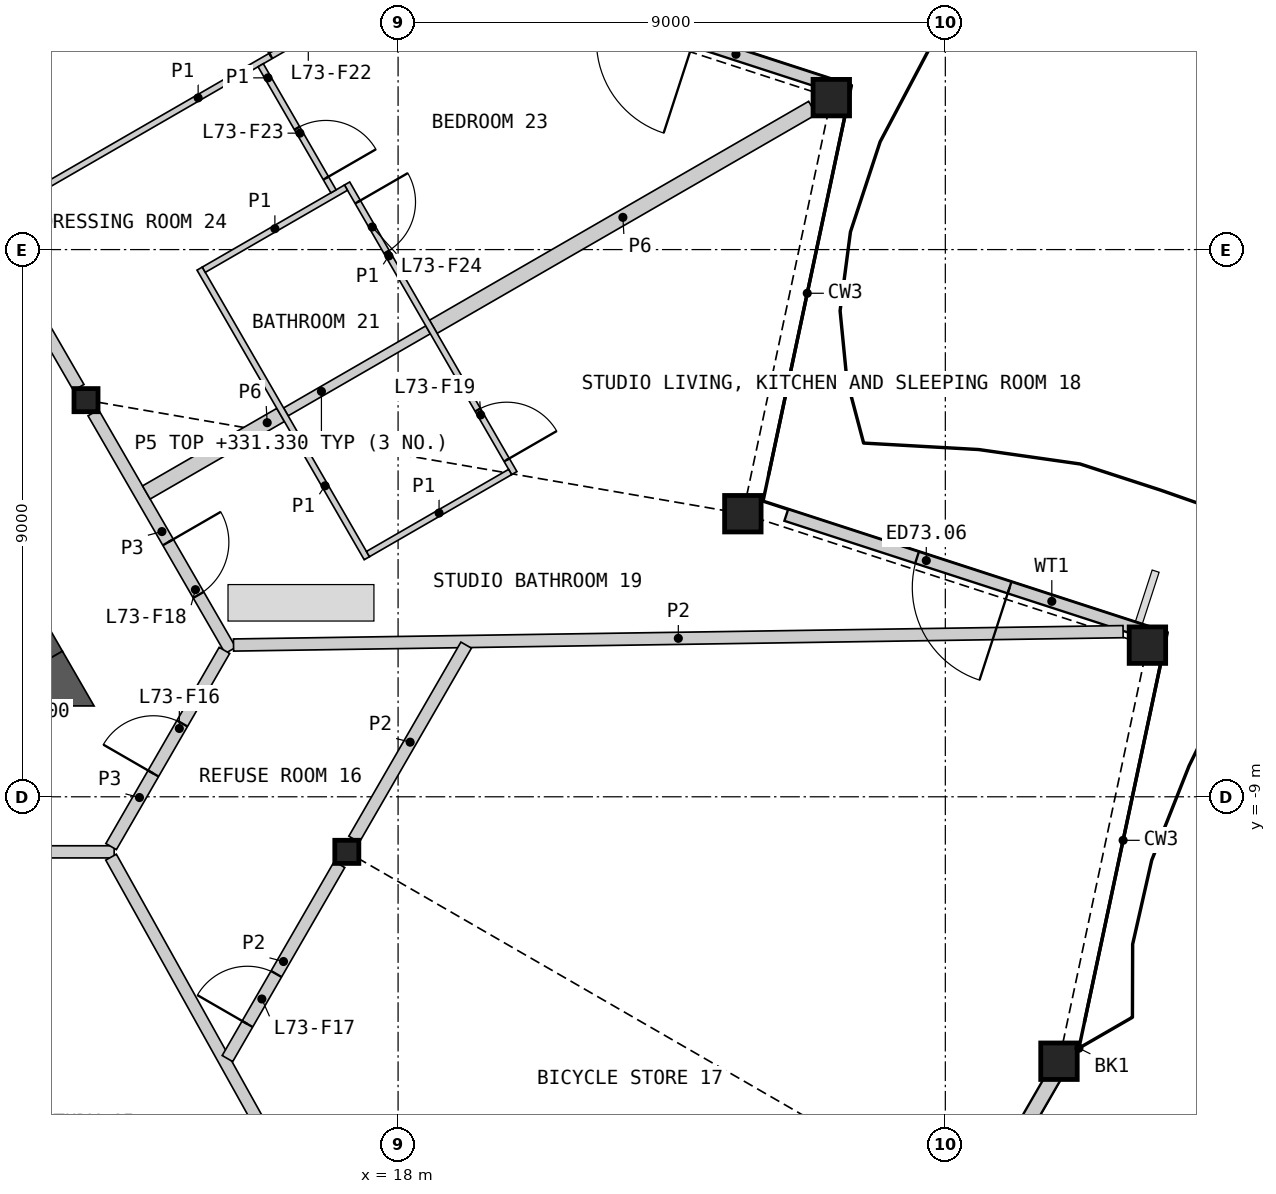
"""IFC4 building model, lengths in metres.
Left out: names, types, materials, properties, quantities, classifications, styles, units other than length and angle.
Written with IfcOpenShell. Run it as: python <this file> out.ifc"""

import sys

from ifc_helpers import new_model, si_unit, direction, frame, frame_2d, origin, origin_2d, place, context, subcontext, project, spatial, polyline, rectangle, hollow_rectangle, i_section, outline, extrude, element, fill, save


model = new_model("IFC4")
c1 = context("Model", 3, precision=1e-05, world=origin(), true_north=direction((0.0, 1.0)))
c2 = subcontext(c1, "Body", "Model", "MODEL_VIEW")
j1 = project(units=[si_unit("LENGTHUNIT", "METRE"), si_unit("PLANEANGLEUNIT", "RADIAN")], contexts=[c1])
p1 = place(None, origin())
s1 = spatial("IfcSite", under=j1, at=p1, CompositionType="ELEMENT")
p2 = place(p1, origin())
s2 = spatial("IfcBuilding", under=s1, at=p2, CompositionType="ELEMENT")
p3 = place(p2, frame((0.0, 0.0, 329.0)))
s3 = spatial("IfcBuildingStorey", under=s2, at=p3, CompositionType="ELEMENT", Elevation=329.0)
for number, where, z_axis, x_axis in (
    (1, (28.869, -13.349, 0.0), (0.0, 0.0, 1.0), (1.0, 0.0, 0.0)),
    (2, (30.324, -6.506, 0.0), (0.0, 0.0, 1.0), (1.0, 0.0, 0.0)),
    (3, (23.67, -4.344, 0.0), (0.0, 0.0, 1.0), (1.0, 0.0, 0.0)),
    (4, (25.125, 2.499, 0.0), (0.0, 0.0, 1.0), (1.0, 0.0, 0.0)),
):
    element("IfcColumn", number, at=place(p3, frame(where, z_axis=z_axis, x_axis=x_axis)), inside=s3, PredefinedType="COLUMN", context=c2, shape_type="SweptSolid", body=[
        extrude(hollow_rectangle(XDim=0.6, YDim=0.6, WallThickness=0.04, at=origin_2d()), origin(), (0.0, 0.0, 1.0), 3.4),
    ])
for number, where, z_axis, x_axis in (
    (5, (17.157, -9.906, 0.0), (0.0, 0.0, 1.0), (1.0, 0.0, 0.0)),
    (6, (12.868, -2.476, 0.0), (0.0, 0.0, 1.0), (1.0, 0.0, 0.0)),
):
    element("IfcColumn", number, at=place(p3, frame(where, z_axis=z_axis, x_axis=x_axis)), inside=s3, PredefinedType="COLUMN", context=c2, shape_type="SweptSolid", body=[
        extrude(i_section(OverallWidth=0.396, OverallDepth=0.381, WebThickness=0.019, FlangeThickness=0.03, at=origin_2d()), origin(), (0.0, 0.0, 1.0), 3.4),
    ])
p4 = place(p3, frame((27.68, -15.513, 0.0), z_axis=(0.0, 0.0, 1.0), x_axis=(0.499982446489, 0.866035538072, 0.0)))
e7 = element("IfcWall", 7, at=p4, inside=s3, PredefinedType="SOLIDWALL", context=c2, shape_type="SweptSolid", body=[
    extrude(rectangle(XDim=2.384, YDim=0.25, at=frame_2d((1.192, 0.0))), origin(), (0.0, 0.0, 1.0), 2.488),
])
p5 = place(p3, frame((30.207, -6.258, 0.0), z_axis=(0.0, 0.0, 1.0), x_axis=(-0.951056631566, 0.309016639608, 0.0)))
e8 = element("IfcWall", 8, at=p5, inside=s3, PredefinedType="SOLIDWALL", context=c2, shape_type="SweptSolid", body=[
    extrude(rectangle(XDim=6.122, YDim=0.2, at=frame_2d((3.061, 0.0))), origin(), (0.0, 0.0, 1.0), 2.488),
])
p6 = place(p5, frame((2.261, 0.0, 0.0)))
e9 = element("IfcOpeningElement", 9, at=p6, cuts=e8, PredefinedType="OPENING", context=c2, shape_type="SweptSolid", body=[
    extrude(rectangle(XDim=1.6, YDim=2.25, at=frame_2d((0.8, 1.125))), frame((0.0, 0.11, 0.0), z_axis=(0.0, -1.0, 0.0), x_axis=(1.0, 0.0, 0.0)), (0.0, 0.0, 1.0), 0.22),
])
p7 = place(p3, frame((25.012, 2.739, 0.0), z_axis=(0.0, 0.0, 1.0), x_axis=(-0.951056631566, 0.309016639608, 0.0)))
e10 = element("IfcWall", 10, at=p7, inside=s3, PredefinedType="SOLIDWALL", context=c2, shape_type="SweptSolid", body=[
    extrude(rectangle(XDim=6.122, YDim=0.2, at=frame_2d((3.061, 0.0))), origin(), (0.0, 0.0, 1.0), 2.488),
])
p8 = place(p7, frame((2.261, 0.0, 0.0)))
e11 = element("IfcOpeningElement", 11, at=p8, cuts=e10, PredefinedType="OPENING", context=c2, shape_type="SweptSolid", body=[
    extrude(rectangle(XDim=1.6, YDim=2.25, at=frame_2d((0.8, 1.125))), frame((0.0, 0.11, 0.0), z_axis=(0.0, -1.0, 0.0), x_axis=(1.0, 0.0, 0.0)), (0.0, 0.0, 1.0), 0.22),
])
p9 = place(p3, frame((12.221, -6.756, 0.0), z_axis=(0.0, 0.0, 1.0), x_axis=(-0.50000604952, 0.866021911064, 0.0)))
e12 = element("IfcWall", 12, at=p9, inside=s3, PredefinedType="SHEAR", context=c2, shape_type="SweptSolid", body=[
    extrude(rectangle(XDim=4.869, YDim=0.6, at=frame_2d((2.434, 0.0))), origin(), (0.0, 0.0, 1.0), 3.1),
])
p10 = place(p3, origin())
e13 = element("IfcWall", 13, at=p10, inside=s3, PredefinedType="SHEAR", context=c2, shape_type="SweptSolid", body=[
    extrude(outline(polyline([(11.961, -7.506), (11.961, -6.906), (12.48, -6.606), (13.0, -7.506), (11.961, -7.506)])), origin(), (0.0, 0.0, 1.0), 3.1),
])
p11 = place(p3, frame((8.698, 4.745, 0.0), z_axis=(0.0, 0.0, 1.0), x_axis=(0.499984266882, -0.866034487114, 0.0)))
e14 = element("IfcWall", 14, at=p11, inside=s3, PredefinedType="PARTITIONING", context=c2, shape_type="SweptSolid", body=[
    extrude(rectangle(XDim=8.099, YDim=0.2, at=frame_2d((4.049, 0.0))), origin(), (0.0, 0.0, 1.0), 3.1),
])
p12 = place(p11, frame((1.976, 0.0, 0.0)))
e15 = element("IfcOpeningElement", 15, at=p12, cuts=e14, PredefinedType="OPENING", context=c2, shape_type="SweptSolid", body=[
    extrude(rectangle(XDim=1.0, YDim=2.1, at=frame_2d((0.5, 1.05))), frame((0.0, 0.11, 0.0), z_axis=(0.0, -1.0, 0.0), x_axis=(1.0, 0.0, 0.0)), (0.0, 0.0, 1.0), 0.22),
])
p13 = place(p3, frame((18.58, -1.27, 0.0), z_axis=(0.0, 0.0, 1.0), x_axis=(0.866024647952, 0.500001309137, 0.0)))
e16 = element("IfcWall", 16, at=p13, inside=s3, PredefinedType="PARTITIONING", context=c2, shape_type="SweptSolid", body=[
    extrude(rectangle(XDim=7.2, YDim=0.25, at=frame_2d((3.6, 0.0))), origin(), (0.0, 0.0, 1.0), 2.33),
])
p14 = place(p3, frame((8.786, -9.906, 0.0), z_axis=(0.0, 0.0, 1.0), x_axis=(1.0, 0.0, 0.0)))
e17 = element("IfcWall", 17, at=p14, inside=s3, PredefinedType="PARTITIONING", context=c2, shape_type="SweptSolid", body=[
    extrude(rectangle(XDim=4.545, YDim=0.2, at=frame_2d((2.272, 0.0))), origin(), (0.0, 0.0, 1.0), 3.1),
])
p15 = place(p3, frame((12.988, -2.684, 0.0), z_axis=(0.0, 0.0, 1.0), x_axis=(0.49999094734, -0.866030630277, 0.0)))
e18 = element("IfcWall", 18, at=p15, inside=s3, PredefinedType="PARTITIONING", context=c2, shape_type="SweptSolid", body=[
    extrude(rectangle(XDim=4.513, YDim=0.2, at=frame_2d((2.256, 0.0))), origin(), (0.0, 0.0, 1.0), 3.1),
])
p16 = place(p15, frame((2.459, 0.0, 0.0)))
e19 = element("IfcOpeningElement", 19, at=p16, cuts=e18, PredefinedType="OPENING", context=c2, shape_type="SweptSolid", body=[
    extrude(rectangle(XDim=1.0, YDim=2.1, at=frame_2d((0.5, 1.05))), frame((0.0, 0.11, 0.0), z_axis=(0.0, -1.0, 0.0), x_axis=(1.0, 0.0, 0.0)), (0.0, 0.0, 1.0), 0.22),
])
p17 = place(p3, frame((13.281, -9.819, 0.0), z_axis=(0.0, 0.0, 1.0), x_axis=(0.499958791762, 0.866049194065, 0.0)))
e20 = element("IfcWall", 20, at=p17, inside=s3, PredefinedType="PARTITIONING", context=c2, shape_type="SweptSolid", body=[
    extrude(rectangle(XDim=3.726, YDim=0.2, at=frame_2d((1.863, 0.0))), origin(), (0.0, 0.0, 1.0), 3.1),
])
p18 = place(p17, frame((1.388, 0.0, 0.0)))
e21 = element("IfcOpeningElement", 21, at=p18, cuts=e20, PredefinedType="OPENING", context=c2, shape_type="SweptSolid", body=[
    extrude(rectangle(XDim=0.95, YDim=2.1, at=frame_2d((0.475, 1.05))), frame((0.0, 0.11, 0.0), z_axis=(0.0, -1.0, 0.0), x_axis=(1.0, 0.0, 0.0)), (0.0, 0.0, 1.0), 0.22),
])
p19 = place(p3, frame((13.86, -3.995, 0.0), z_axis=(0.0, 0.0, 1.0), x_axis=(0.866030925526, 0.499990435942, 0.0)))
e22 = element("IfcWall", 22, at=p19, inside=s3, PredefinedType="PARTITIONING", context=c2, shape_type="SweptSolid", body=[
    extrude(rectangle(XDim=2.55, YDim=0.25, at=frame_2d((1.275, 0.0))), origin(), (0.0, 0.0, 1.0), 2.33),
])
p20 = place(p3, frame((13.28, -9.993, 0.0), z_axis=(0.0, 0.0, 1.0), x_axis=(0.486918292843, -0.873447523378, 0.0)))
e23 = element("IfcWall", 23, at=p20, inside=s3, PredefinedType="PARTITIONING", context=c2, shape_type="SweptSolid", body=[
    extrude(rectangle(XDim=14.801, YDim=0.2, at=frame_2d((7.4, 0.0))), origin(), (0.0, 0.0, 1.0), 2.33),
])
p21 = place(p3, frame((15.294, -6.504, 0.0), z_axis=(0.0, 0.0, 1.0), x_axis=(0.999886982846, 0.015034012608, 0.0)))
e24 = element("IfcWall", 24, at=p21, inside=s3, PredefinedType="PARTITIONING", context=c2, shape_type="SweptSolid", body=[
    extrude(rectangle(XDim=14.632, YDim=0.2, at=frame_2d((7.316, 0.0))), origin(), (0.0, 0.0, 1.0), 2.33),
])
p22 = place(p3, frame((15.194, -13.306, 0.0), z_axis=(0.0, 0.0, 1.0), x_axis=(0.50002820729, 0.866009117685, 0.0)))
e25 = element("IfcWall", 25, at=p22, inside=s3, PredefinedType="PARTITIONING", context=c2, shape_type="SweptSolid", body=[
    extrude(rectangle(XDim=3.686, YDim=0.2, at=frame_2d((1.843, 0.0))), origin(), (0.0, 0.0, 1.0), 2.33),
])
p23 = place(p22, frame((0.656, 0.0, 0.0)))
e26 = element("IfcOpeningElement", 26, at=p23, cuts=e25, PredefinedType="OPENING", context=c2, shape_type="SweptSolid", body=[
    extrude(rectangle(XDim=0.95, YDim=2.1, at=frame_2d((0.475, 1.05))), frame((0.0, 0.11, 0.0), z_axis=(0.0, -1.0, 0.0), x_axis=(1.0, 0.0, 0.0)), (0.0, 0.0, 1.0), 0.22),
])
p24 = place(p3, frame((17.277, -9.698, 0.0), z_axis=(0.0, 0.0, 1.0), x_axis=(0.499978535015, 0.866037796245, 0.0)))
e27 = element("IfcWall", 27, at=p24, inside=s3, PredefinedType="PARTITIONING", context=c2, shape_type="SweptSolid", body=[
    extrude(rectangle(XDim=3.686, YDim=0.2, at=frame_2d((1.843, 0.0))), origin(), (0.0, 0.0, 1.0), 2.33),
])
p25 = place(p3, frame((16.155, -2.67, 0.0), z_axis=(0.0, 0.0, 1.0), x_axis=(0.86599734893, 0.500048589285, 0.0)))
e28 = element("IfcWall", 28, at=p25, inside=s3, PredefinedType="PLUMBINGWALL", context=c2, shape_type="SweptSolid", body=[
    extrude(rectangle(XDim=2.7, YDim=0.15, at=frame_2d((1.35, 0.0))), origin(), (0.0, 0.0, 1.0), 2.33),
])
p26 = place(p3, frame((11.262, 0.504, 0.0), z_axis=(0.0, 0.0, 1.0), x_axis=(0.866020217342, 0.500008983073, 0.0)))
e29 = element("IfcWall", 29, at=p26, inside=s3, PredefinedType="PARTITIONING", context=c2, shape_type="SweptSolid", body=[
    extrude(rectangle(XDim=7.966, YDim=0.1, at=frame_2d((3.983, 0.0))), origin(), (0.0, 0.0, 1.0), 2.33),
])
p27 = place(p26, frame((5.362, 0.0, 0.0)))
e30 = element("IfcOpeningElement", 30, at=p27, cuts=e29, PredefinedType="OPENING", context=c2, shape_type="SweptSolid", body=[
    extrude(rectangle(XDim=0.95, YDim=2.1, at=frame_2d((0.475, 1.05))), frame((0.0, 0.06, 0.0), z_axis=(0.0, -1.0, 0.0), x_axis=(1.0, 0.0, 0.0)), (0.0, 0.0, 1.0), 0.12),
])
p28 = place(p3, frame((17.161, 1.087, 0.0), z_axis=(0.0, 0.0, 1.0), x_axis=(0.499996545922, -0.866027397988, 0.0)))
e31 = element("IfcWall", 31, at=p28, inside=s3, PredefinedType="PARTITIONING", context=c2, shape_type="SweptSolid", body=[
    extrude(rectangle(XDim=5.5, YDim=0.1, at=frame_2d((2.75, 0.0))), origin(), (0.0, 0.0, 1.0), 2.33),
])
p29 = place(p28, frame((4.3, 0.0, 0.0)))
e32 = element("IfcOpeningElement", 32, at=p29, cuts=e31, PredefinedType="OPENING", context=c2, shape_type="SweptSolid", body=[
    extrude(rectangle(XDim=0.95, YDim=2.1, at=frame_2d((0.475, 1.05))), frame((0.0, 0.06, 0.0), z_axis=(0.0, -1.0, 0.0), x_axis=(1.0, 0.0, 0.0)), (0.0, 0.0, 1.0), 0.12),
])
p30 = place(p28, frame((0.351, 0.0, 0.0)))
e33 = element("IfcOpeningElement", 33, at=p30, cuts=e31, PredefinedType="OPENING", context=c2, shape_type="SweptSolid", body=[
    extrude(rectangle(XDim=0.95, YDim=2.1, at=frame_2d((0.475, 1.05))), frame((0.0, 0.06, 0.0), z_axis=(0.0, -1.0, 0.0), x_axis=(1.0, 0.0, 0.0)), (0.0, 0.0, 1.0), 0.12),
])
p31 = place(p3, frame((14.736, -0.313, 0.0), z_axis=(0.0, 0.0, 1.0), x_axis=(0.49997732567, -0.866038494419, 0.0)))
e34 = element("IfcWall", 34, at=p31, inside=s3, PredefinedType="PARTITIONING", context=c2, shape_type="SweptSolid", body=[
    extrude(rectangle(XDim=5.5, YDim=0.1, at=frame_2d((2.75, 0.0))), origin(), (0.0, 0.0, 1.0), 2.33),
])
p32 = place(p3, frame((17.505, -5.008, 0.0), z_axis=(0.0, 0.0, 1.0), x_axis=(0.866019956843, 0.50000943426, 0.0)))
e35 = element("IfcWall", 35, at=p32, inside=s3, PredefinedType="PARTITIONING", context=c2, shape_type="SweptSolid", body=[
    extrude(rectangle(XDim=2.7, YDim=0.1, at=frame_2d((1.35, 0.0))), origin(), (0.0, 0.0, 1.0), 2.33),
])
p33 = place(p3, frame((14.805, -0.331, 0.0), z_axis=(0.0, 0.0, 1.0), x_axis=(0.866059108428, 0.4999416173, 0.0)))
e36 = element("IfcWall", 36, at=p33, inside=s3, PredefinedType="PARTITIONING", context=c2, shape_type="SweptSolid", body=[
    extrude(rectangle(XDim=2.7, YDim=0.1, at=frame_2d((1.35, 0.0))), origin(), (0.0, 0.0, 1.0), 2.33),
])
p34 = place(p3, frame((15.74, 3.032, 0.0), z_axis=(0.0, 0.0, 1.0), x_axis=(0.500075453945, -0.865981836046, 0.0)))
e37 = element("IfcWall", 37, at=p34, inside=s3, PredefinedType="PARTITIONING", context=c2, shape_type="SweptSolid", body=[
    extrude(rectangle(XDim=2.395, YDim=0.1, at=frame_2d((1.197, 0.0))), origin(), (0.0, 0.0, 1.0), 2.33),
])
p35 = place(p34, frame((1.195, 0.0, 0.0)))
e38 = element("IfcOpeningElement", 38, at=p35, cuts=e37, PredefinedType="OPENING", context=c2, shape_type="SweptSolid", body=[
    extrude(rectangle(XDim=0.95, YDim=2.1, at=frame_2d((0.475, 1.05))), frame((0.0, 0.06, 0.0), z_axis=(0.0, -1.0, 0.0), x_axis=(1.0, 0.0, 0.0)), (0.0, 0.0, 1.0), 0.12),
])
p36 = place(p6, origin())
e39 = element("IfcDoor", 39, at=p36, inside=s3, OperationType="DOUBLE_DOOR_SINGLE_SWING", PredefinedType="DOOR", context=c2, shape_type="SweptSolid", body=[
    extrude(rectangle(XDim=1.6, YDim=2.25, at=frame_2d((0.8, 1.125))), frame((0.0, 0.025, 0.0), z_axis=(0.0, -1.0, 0.0), x_axis=(1.0, 0.0, 0.0)), (0.0, 0.0, 1.0), 0.05),
])
fill(e9, e39)
p37 = place(p18, origin())
e40 = element("IfcDoor", 40, at=p37, inside=s3, OperationType="SINGLE_SWING_LEFT", PredefinedType="DOOR", context=c2, shape_type="SweptSolid", body=[
    extrude(rectangle(XDim=0.95, YDim=2.1, at=frame_2d((0.475, 1.05))), frame((0.0, 0.025, 0.0), z_axis=(0.0, -1.0, 0.0), x_axis=(1.0, 0.0, 0.0)), (0.0, 0.0, 1.0), 0.05),
])
fill(e21, e40)
p38 = place(p23, origin())
e41 = element("IfcDoor", 41, at=p38, inside=s3, OperationType="SINGLE_SWING_LEFT", PredefinedType="DOOR", context=c2, shape_type="SweptSolid", body=[
    extrude(rectangle(XDim=0.95, YDim=2.1, at=frame_2d((0.475, 1.05))), frame((0.0, 0.025, 0.0), z_axis=(0.0, -1.0, 0.0), x_axis=(1.0, 0.0, 0.0)), (0.0, 0.0, 1.0), 0.05),
])
fill(e26, e41)
p39 = place(p16, origin())
e42 = element("IfcDoor", 42, at=p39, inside=s3, OperationType="SINGLE_SWING_LEFT", PredefinedType="DOOR", context=c2, shape_type="SweptSolid", body=[
    extrude(rectangle(XDim=1.0, YDim=2.1, at=frame_2d((0.5, 1.05))), frame((0.0, 0.025, 0.0), z_axis=(0.0, -1.0, 0.0), x_axis=(1.0, 0.0, 0.0)), (0.0, 0.0, 1.0), 0.05),
])
fill(e19, e42)
p40 = place(p29, origin())
e43 = element("IfcDoor", 43, at=p40, inside=s3, OperationType="SINGLE_SWING_RIGHT", PredefinedType="DOOR", context=c2, shape_type="SweptSolid", body=[
    extrude(rectangle(XDim=0.95, YDim=2.1, at=frame_2d((0.475, 1.05))), frame((0.0, 0.025, 0.0), z_axis=(0.0, -1.0, 0.0), x_axis=(1.0, 0.0, 0.0)), (0.0, 0.0, 1.0), 0.05),
])
fill(e32, e43)
p41 = place(p27, origin())
e44 = element("IfcDoor", 44, at=p41, inside=s3, OperationType="SINGLE_SWING_LEFT", PredefinedType="DOOR", context=c2, shape_type="SweptSolid", body=[
    extrude(rectangle(XDim=0.95, YDim=2.1, at=frame_2d((0.475, 1.05))), frame((0.0, 0.025, 0.0), z_axis=(0.0, -1.0, 0.0), x_axis=(1.0, 0.0, 0.0)), (0.0, 0.0, 1.0), 0.05),
])
fill(e30, e44)
p42 = place(p35, origin())
e45 = element("IfcDoor", 45, at=p42, inside=s3, OperationType="SINGLE_SWING_RIGHT", PredefinedType="DOOR", context=c2, shape_type="SweptSolid", body=[
    extrude(rectangle(XDim=0.95, YDim=2.1, at=frame_2d((0.475, 1.05))), frame((0.0, 0.025, 0.0), z_axis=(0.0, -1.0, 0.0), x_axis=(1.0, 0.0, 0.0)), (0.0, 0.0, 1.0), 0.05),
])
fill(e38, e45)
p43 = place(p30, origin())
e46 = element("IfcDoor", 46, at=p43, inside=s3, OperationType="SINGLE_SWING_LEFT", PredefinedType="DOOR", context=c2, shape_type="SweptSolid", body=[
    extrude(rectangle(XDim=0.95, YDim=2.1, at=frame_2d((0.475, 1.05))), frame((0.0, 0.025, 0.0), z_axis=(0.0, -1.0, 0.0), x_axis=(1.0, 0.0, 0.0)), (0.0, 0.0, 1.0), 0.05),
])
fill(e33, e46)
save(model, sys.argv[1])
